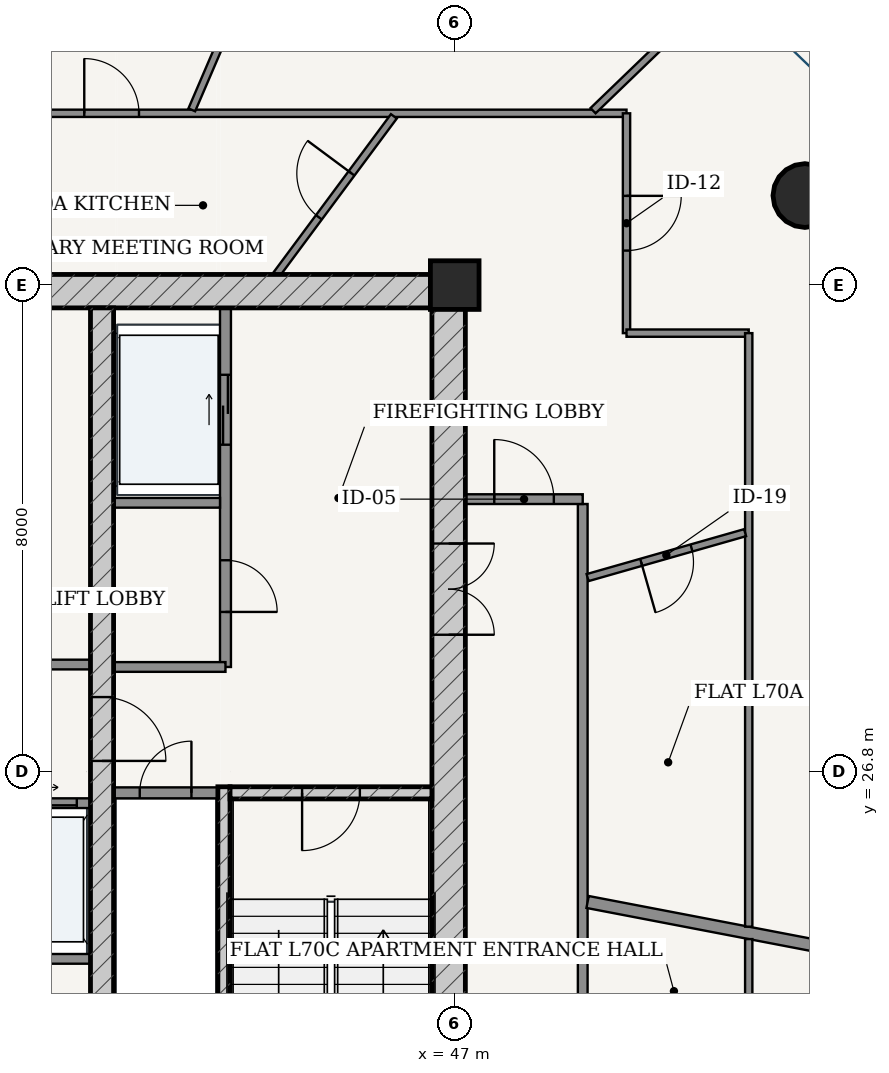
"""IFC4 building model, lengths in metres.
Left out: names, types, materials, properties, quantities, classifications, styles, units other than length and angle.
Written with IfcOpenShell. Run it as: python <this file> out.ifc"""

import sys

from ifc_helpers import new_model, si_unit, direction, frame, frame_2d, origin, origin_2d, place, context, subcontext, project, spatial, rectangle, hollow_circle, extrude, source, transform, mapped, element, fill, save


model = new_model("IFC4")
c1 = context("Model", 3, precision=1e-05, world=origin(), true_north=direction((-0.2419218956, 0.970295726276)))
c2 = subcontext(c1, "Body", "Model", "MODEL_VIEW")
j1 = project(units=[si_unit("LENGTHUNIT", "METRE"), si_unit("PLANEANGLEUNIT", "RADIAN")], contexts=[c1])
p1 = place(None, origin())
s1 = spatial("IfcSite", under=j1, at=p1, CompositionType="ELEMENT")
p2 = place(p1, origin())
s2 = spatial("IfcBuilding", under=s1, at=p2, CompositionType="ELEMENT")
p3 = place(p2, frame((0.0, 0.0, 266.95)))
s3 = spatial("IfcBuildingStorey", under=s2, at=p3, CompositionType="ELEMENT", Elevation=266.95)
p4 = place(p3, frame((47.0, 34.8, 0.0), z_axis=(0.0, 0.0, 1.0), x_axis=(1.0, 0.0, 0.0)))
e1 = element("IfcColumn", 1, at=p4, inside=s3, PredefinedType="COLUMN", context=c2, shape_type="SweptSolid", body=[
    extrude(rectangle(XDim=0.8, YDim=0.8, at=origin_2d()), origin(), (0.0, 0.0, 1.0), 3.75),
])
p5 = place(p3, frame((28.825, 34.7, 0.0), z_axis=(0.0, 0.0, 1.0), x_axis=(1.0, 0.0, 0.0)))
e2 = element("IfcWall", 2, at=p5, inside=s3, PredefinedType="SHEAR", context=c2, shape_type="SweptSolid", body=[
    extrude(rectangle(XDim=18.35, YDim=0.55, at=frame_2d((9.175, 0.0))), origin(), (0.0, 0.0, 1.0), 3.49),
])
p6 = place(p3, frame((46.9, 19.175, 0.0), z_axis=(0.0, 0.0, 1.0), x_axis=(0.0, 1.0, 0.0)))
e3 = element("IfcWall", 3, at=p6, inside=s3, PredefinedType="SHEAR", context=c2, shape_type="SweptSolid", body=[
    extrude(rectangle(XDim=15.25, YDim=0.55, at=frame_2d((7.625, 0.0))), origin(), (0.0, 0.0, 1.0), 3.49),
])
p7 = place(p6, frame((9.875, 0.0, 0.0)))
e4 = element("IfcOpeningElement", 4, at=p7, cuts=e3, PredefinedType="OPENING", context=c2, shape_type="SweptSolid", body=[
    extrude(rectangle(XDim=1.5, YDim=2.2, at=frame_2d((0.75, 1.1))), frame((0.0, 0.285, 0.0), z_axis=(0.0, -1.0, 0.0), x_axis=(1.0, 0.0, 0.0)), (0.0, 0.0, 1.0), 0.57),
])
p8 = place(p3, frame((43.205, 19.175, 0.0), z_axis=(0.0, 0.0, 1.0), x_axis=(0.0, 1.0, 0.0)))
e5 = element("IfcWall", 5, at=p8, inside=s3, PredefinedType="SOLIDWALL", context=c2, shape_type="SweptSolid", body=[
    extrude(rectangle(XDim=7.375, YDim=0.2, at=frame_2d((3.688, 0.0))), origin(), (0.0, 0.0, 1.0), 3.49),
])
p9 = place(p3, frame((43.305, 26.45, 0.0), z_axis=(0.0, 0.0, 1.0), x_axis=(1.0, 0.0, 0.0)))
e6 = element("IfcWall", 6, at=p9, inside=s3, PredefinedType="SOLIDWALL", context=c2, shape_type="SweptSolid", body=[
    extrude(rectangle(XDim=3.32, YDim=0.2, at=frame_2d((1.66, 0.0))), origin(), (0.0, 0.0, 1.0), 3.49),
])
p10 = place(p9, frame((1.185, 0.0, 0.0)))
e7 = element("IfcOpeningElement", 7, at=p10, cuts=e6, PredefinedType="OPENING", context=c2, shape_type="SweptSolid", body=[
    extrude(rectangle(XDim=0.95, YDim=2.15, at=frame_2d((0.475, 1.075))), frame((0.0, 0.11, 0.0), z_axis=(0.0, -1.0, 0.0), x_axis=(1.0, 0.0, 0.0)), (0.0, 0.0, 1.0), 0.22),
])
p11 = place(p3, frame((41.2, 19.175, 0.0), z_axis=(0.0, 0.0, 1.0), x_axis=(0.0, 1.0, 0.0)))
e8 = element("IfcWall", 8, at=p11, inside=s3, PredefinedType="SHEAR", context=c2, shape_type="SweptSolid", body=[
    extrude(rectangle(XDim=15.25, YDim=0.38, at=frame_2d((7.625, 0.0))), origin(), (0.0, 0.0, 1.0), 3.49),
])
p12 = place(p11, frame((7.8, 0.0, 0.0)))
e9 = element("IfcOpeningElement", 9, at=p12, cuts=e8, PredefinedType="OPENING", context=c2, shape_type="SweptSolid", body=[
    extrude(rectangle(XDim=1.05, YDim=2.15, at=frame_2d((0.525, 1.075))), frame((0.0, 0.2, 0.0), z_axis=(0.0, -1.0, 0.0), x_axis=(1.0, 0.0, 0.0)), (0.0, 0.0, 1.0), 0.4),
])
p13 = place(p3, frame((52.759, 36.272, 0.0), z_axis=(0.0, 0.0, 1.0), x_axis=(1.0, 0.0, 0.0)))
e10 = element("IfcColumn", 10, at=p13, inside=s3, PredefinedType="COLUMN", context=c2, shape_type="SweptSolid", body=[
    extrude(hollow_circle(Radius=0.525, WallThickness=0.035, at=origin_2d()), origin(), (0.0, 0.0, 1.0), 3.75),
])
p14 = place(p3, frame((41.39, 26.45, 0.0), z_axis=(0.0, 0.0, 1.0), x_axis=(1.0, 0.0, 0.0)))
e11 = element("IfcWall", 11, at=p14, inside=s3, PredefinedType="PARTITIONING", context=c2, shape_type="SweptSolid", body=[
    extrude(rectangle(XDim=1.71, YDim=0.18, at=frame_2d((0.855, 0.0))), origin(), (0.0, 0.0, 1.0), 3.49),
])
p15 = place(p14, frame((0.43, 0.0, 0.0)))
e12 = element("IfcOpeningElement", 12, at=p15, cuts=e11, PredefinedType="OPENING", context=c2, shape_type="SweptSolid", body=[
    extrude(rectangle(XDim=0.85, YDim=2.1, at=frame_2d((0.425, 1.05))), frame((0.0, 0.1, 0.0), z_axis=(0.0, -1.0, 0.0), x_axis=(1.0, 0.0, 0.0)), (0.0, 0.0, 1.0), 0.2),
])
p16 = place(p3, frame((43.23, 28.52, 0.0), z_axis=(0.0, 0.0, 1.0), x_axis=(0.0, 1.0, 0.0)))
e13 = element("IfcWall", 13, at=p16, inside=s3, PredefinedType="PARTITIONING", context=c2, shape_type="SweptSolid", body=[
    extrude(rectangle(XDim=5.905, YDim=0.18, at=frame_2d((2.953, 0.0))), origin(), (0.0, 0.0, 1.0), 3.49),
])
p17 = place(p16, frame((0.905, 0.0, 0.0)))
e14 = element("IfcOpeningElement", 14, at=p17, cuts=e13, PredefinedType="OPENING", context=c2, shape_type="SweptSolid", body=[
    extrude(rectangle(XDim=0.85, YDim=2.1, at=frame_2d((0.425, 1.05))), frame((0.0, 0.1, 0.0), z_axis=(0.0, -1.0, 0.0), x_axis=(1.0, 0.0, 0.0)), (0.0, 0.0, 1.0), 0.2),
])
p18 = place(p16, frame((3.655, 0.0, 0.0)))
e15 = element("IfcOpeningElement", 15, at=p18, cuts=e13, PredefinedType="OPENING", context=c2, shape_type="SweptSolid", body=[
    extrude(rectangle(XDim=1.15, YDim=2.2, at=frame_2d((0.575, 1.1))), frame((0.0, 0.1, 0.0), z_axis=(0.0, -1.0, 0.0), x_axis=(1.0, 0.0, 0.0)), (0.0, 0.0, 1.0), 0.2),
])
p19 = place(p3, frame((41.39, 31.22, 0.0), z_axis=(0.0, 0.0, 1.0), x_axis=(1.0, 0.0, 0.0)))
e16 = element("IfcWall", 16, at=p19, inside=s3, PredefinedType="PARTITIONING", context=c2, shape_type="SweptSolid", body=[
    extrude(rectangle(XDim=1.75, YDim=0.16, at=frame_2d((0.875, 0.0))), origin(), (0.0, 0.0, 1.0), 3.49),
])
p20 = place(p3, frame((41.39, 28.52, 0.0), z_axis=(0.0, 0.0, 1.0), x_axis=(1.0, 0.0, 0.0)))
e17 = element("IfcWall", 17, at=p20, inside=s3, PredefinedType="PARTITIONING", context=c2, shape_type="SweptSolid", body=[
    extrude(rectangle(XDim=1.84, YDim=0.16, at=frame_2d((0.92, 0.0))), origin(), (0.0, 0.0, 1.0), 3.49),
])
p21 = place(p3, frame((34.99, 28.56, 0.0), z_axis=(0.0, 0.0, 1.0), x_axis=(1.0, 0.0, 0.0)))
e18 = element("IfcWall", 18, at=p21, inside=s3, PredefinedType="PARTITIONING", context=c2, shape_type="SweptSolid", body=[
    extrude(rectangle(XDim=6.02, YDim=0.16, at=frame_2d((3.01, 0.0))), origin(), (0.0, 0.0, 1.0), 3.49),
])
p22 = place(p21, frame((2.585, 0.0, 0.0)))
e19 = element("IfcOpeningElement", 19, at=p22, cuts=e18, PredefinedType="OPENING", context=c2, shape_type="SweptSolid", body=[
    extrude(rectangle(XDim=0.85, YDim=2.1, at=frame_2d((0.425, 1.05))), frame((0.0, 0.09, 0.0), z_axis=(0.0, -1.0, 0.0), x_axis=(1.0, 0.0, 0.0)), (0.0, 0.0, 1.0), 0.18),
])
p23 = place(p3, frame((34.99, 26.28, 0.0), z_axis=(0.0, 0.0, 1.0), x_axis=(1.0, 0.0, 0.0)))
e20 = element("IfcWall", 20, at=p23, inside=s3, PredefinedType="PARTITIONING", context=c2, shape_type="SweptSolid", body=[
    extrude(rectangle(XDim=6.02, YDim=0.16, at=frame_2d((3.01, 0.0))), origin(), (0.0, 0.0, 1.0), 3.49),
])
p24 = place(p23, frame((1.045, 0.0, 0.0)))
e21 = element("IfcOpeningElement", 21, at=p24, cuts=e20, PredefinedType="OPENING", context=c2, shape_type="SweptSolid", body=[
    extrude(rectangle(XDim=0.85, YDim=2.1, at=frame_2d((0.425, 1.05))), frame((0.0, 0.09, 0.0), z_axis=(0.0, -1.0, 0.0), x_axis=(1.0, 0.0, 0.0)), (0.0, 0.0, 1.0), 0.18),
])
p25 = place(p23, frame((3.215, 0.0, 0.0)))
e22 = element("IfcOpeningElement", 22, at=p25, cuts=e20, PredefinedType="OPENING", context=c2, shape_type="SweptSolid", body=[
    extrude(rectangle(XDim=1.1, YDim=2.2, at=frame_2d((0.55, 1.1))), frame((0.0, 0.09, 0.0), z_axis=(0.0, -1.0, 0.0), x_axis=(1.0, 0.0, 0.0)), (0.0, 0.0, 1.0), 0.18),
])
p26 = place(p23, frame((4.695, 0.0, 0.0)))
e23 = element("IfcOpeningElement", 23, at=p26, cuts=e20, PredefinedType="OPENING", context=c2, shape_type="SweptSolid", body=[
    extrude(rectangle(XDim=1.1, YDim=2.2, at=frame_2d((0.55, 1.1))), frame((0.0, 0.09, 0.0), z_axis=(0.0, -1.0, 0.0), x_axis=(1.0, 0.0, 0.0)), (0.0, 0.0, 1.0), 0.18),
])
p27 = place(p3, frame((34.99, 23.72, 0.0), z_axis=(0.0, 0.0, 1.0), x_axis=(1.0, 0.0, 0.0)))
e24 = element("IfcWall", 24, at=p27, inside=s3, PredefinedType="PARTITIONING", context=c2, shape_type="SweptSolid", body=[
    extrude(rectangle(XDim=6.02, YDim=0.16, at=frame_2d((3.01, 0.0))), origin(), (0.0, 0.0, 1.0), 3.49),
])
p28 = place(p3, frame((49.105, 17.275, 0.0), z_axis=(0.0, 0.0, 1.0), x_axis=(0.0, 1.0, 0.0)))
e25 = element("IfcWall", 25, at=p28, inside=s3, PredefinedType="PARTITIONING", context=c2, shape_type="SweptSolid", body=[
    extrude(rectangle(XDim=13.925, YDim=0.16, at=frame_2d((6.962, 0.0))), origin(), (0.0, 0.0, 1.0), 3.015),
])
p29 = place(p28, frame((3.647, 0.0, 0.0)))
e26 = element("IfcOpeningElement", 26, at=p29, cuts=e25, PredefinedType="OPENING", context=c2, shape_type="SweptSolid", body=[
    extrude(rectangle(XDim=0.98, YDim=2.2, at=frame_2d((0.49, 1.1))), frame((0.0, 0.09, 0.0), z_axis=(0.0, -1.0, 0.0), x_axis=(1.0, 0.0, 0.0)), (0.0, 0.0, 1.0), 0.18),
])
p30 = place(p3, frame((47.175, 31.28, 0.0), z_axis=(0.0, 0.0, 1.0), x_axis=(1.0, 0.0, 0.0)))
e27 = element("IfcWall", 27, at=p30, inside=s3, PredefinedType="PARTITIONING", context=c2, shape_type="SweptSolid", body=[
    extrude(rectangle(XDim=1.93, YDim=0.16, at=frame_2d((0.965, 0.0))), origin(), (0.0, 0.0, 1.0), 3.49),
])
p31 = place(p30, frame((0.475, 0.0, 0.0)))
e28 = element("IfcOpeningElement", 28, at=p31, cuts=e27, PredefinedType="OPENING", context=c2, shape_type="SweptSolid", body=[
    extrude(rectangle(XDim=0.98, YDim=2.2, at=frame_2d((0.49, 1.1))), frame((0.0, 0.09, 0.0), z_axis=(0.0, -1.0, 0.0), x_axis=(1.0, 0.0, 0.0)), (0.0, 0.0, 1.0), 0.18),
])
p32 = place(p3, frame((49.185, 24.656, 0.0), z_axis=(0.0, 0.0, 1.0), x_axis=(0.982109889803, -0.188308694305, 0.0)))
e29 = element("IfcWall", 29, at=p32, inside=s3, PredefinedType="PARTITIONING", context=c2, shape_type="SweptSolid", body=[
    extrude(rectangle(XDim=7.884, YDim=0.2, at=frame_2d((3.942, 0.0))), origin(), (0.0, 0.0, 1.0), 3.015),
])
p33 = place(p3, frame((26.175, 37.625, 0.0), z_axis=(0.0, 0.0, 1.0), x_axis=(1.0, 0.0, 0.0)))
e30 = element("IfcWall", 30, at=p33, inside=s3, PredefinedType="PARTITIONING", context=c2, shape_type="SweptSolid", body=[
    extrude(rectangle(XDim=23.65, YDim=0.12, at=frame_2d((11.825, 0.0))), origin(), (0.0, 0.0, 1.0), 3.015),
])
p34 = place(p33, frame((14.733, 0.0, 0.0)))
e31 = element("IfcOpeningElement", 31, at=p34, cuts=e30, PredefinedType="OPENING", context=c2, shape_type="SweptSolid", body=[
    extrude(rectangle(XDim=0.9, YDim=2.15, at=frame_2d((0.45, 1.075))), frame((0.0, 0.07, 0.0), z_axis=(0.0, -1.0, 0.0), x_axis=(1.0, 0.0, 0.0)), (0.0, 0.0, 1.0), 0.14),
])
p35 = place(p33, frame((11.279, 0.0, 0.0)))
e32 = element("IfcOpeningElement", 32, at=p35, cuts=e30, PredefinedType="OPENING", context=c2, shape_type="SweptSolid", body=[
    extrude(rectangle(XDim=0.9, YDim=2.15, at=frame_2d((0.45, 1.075))), frame((0.0, 0.07, 0.0), z_axis=(0.0, -1.0, 0.0), x_axis=(1.0, 0.0, 0.0)), (0.0, 0.0, 1.0), 0.14),
])
p36 = place(p33, frame((2.678, 0.0, 0.0)))
e33 = element("IfcOpeningElement", 33, at=p36, cuts=e30, PredefinedType="OPENING", context=c2, shape_type="SweptSolid", body=[
    extrude(rectangle(XDim=0.9, YDim=2.15, at=frame_2d((0.45, 1.075))), frame((0.0, 0.07, 0.0), z_axis=(0.0, -1.0, 0.0), x_axis=(1.0, 0.0, 0.0)), (0.0, 0.0, 1.0), 0.14),
])
p37 = place(p3, frame((49.825, 37.625, 0.0), z_axis=(0.0, 0.0, 1.0), x_axis=(0.0, -1.0, 0.0)))
e34 = element("IfcWall", 34, at=p37, inside=s3, PredefinedType="PARTITIONING", context=c2, shape_type="SweptSolid", body=[
    extrude(rectangle(XDim=3.615, YDim=0.12, at=frame_2d((1.808, 0.0))), origin(), (0.0, 0.0, 1.0), 3.015),
])
p38 = place(p37, frame((1.357, 0.0, 0.0)))
e35 = element("IfcOpeningElement", 35, at=p38, cuts=e34, PredefinedType="OPENING", context=c2, shape_type="SweptSolid", body=[
    extrude(rectangle(XDim=0.9, YDim=2.15, at=frame_2d((0.45, 1.075))), frame((0.0, 0.07, 0.0), z_axis=(0.0, -1.0, 0.0), x_axis=(1.0, 0.0, 0.0)), (0.0, 0.0, 1.0), 0.14),
])
p39 = place(p3, frame((49.825, 34.01, 0.0), z_axis=(0.0, 0.0, 1.0), x_axis=(1.0, 0.0, 0.0)))
e36 = element("IfcWall", 36, at=p39, inside=s3, PredefinedType="PARTITIONING", context=c2, shape_type="SweptSolid", body=[
    extrude(rectangle(XDim=2.01, YDim=0.12, at=frame_2d((1.005, 0.0))), origin(), (0.0, 0.0, 1.0), 3.209),
])
p40 = place(p3, frame((51.835, 34.01, 0.0), z_axis=(0.0, 0.0, 1.0), x_axis=(0.0, -1.0, 0.0)))
e37 = element("IfcWall", 37, at=p40, inside=s3, PredefinedType="PARTITIONING", context=c2, shape_type="SweptSolid", body=[
    extrude(rectangle(XDim=9.761, YDim=0.12, at=frame_2d((4.88, 0.0))), origin(), (0.0, 0.0, 1.0), 3.015),
])
p41 = place(p3, frame((49.275, 37.668, 0.0), z_axis=(0.0, 0.0, 1.0), x_axis=(0.719954096891, 0.694021684366, 0.0)))
e38 = element("IfcWall", 38, at=p41, inside=s3, PredefinedType="PARTITIONING", context=c2, shape_type="SweptSolid", body=[
    extrude(rectangle(XDim=3.333, YDim=0.12, at=frame_2d((1.667, 0.0))), origin(), (0.0, 0.0, 1.0), 3.121),
])
p42 = place(p3, frame((42.676, 37.682, 0.0), z_axis=(0.0, 0.0, 1.0), x_axis=(0.394777489933, 0.918776759307, 0.0)))
e39 = element("IfcWall", 39, at=p42, inside=s3, PredefinedType="PARTITIONING", context=c2, shape_type="SweptSolid", body=[
    extrude(rectangle(XDim=6.9, YDim=0.12, at=frame_2d((3.45, 0.0))), origin(), (0.0, 0.0, 1.0), 3.121),
])
p43 = place(p42, frame((3.0, 0.0, 0.0)))
e40 = element("IfcOpeningElement", 40, at=p43, cuts=e39, PredefinedType="OPENING", context=c2, shape_type="SweptSolid", body=[
    extrude(rectangle(XDim=0.9, YDim=2.15, at=frame_2d((0.45, 1.075))), frame((0.0, 0.07, 0.0), z_axis=(0.0, -1.0, 0.0), x_axis=(1.0, 0.0, 0.0)), (0.0, 0.0, 1.0), 0.14),
])
p44 = place(p3, frame((49.185, 29.99, 0.0), z_axis=(0.0, 0.0, 1.0), x_axis=(0.961653809431, 0.274266204273, 0.0)))
e41 = element("IfcWall", 41, at=p44, inside=s3, PredefinedType="PARTITIONING", context=c2, shape_type="SweptSolid", body=[
    extrude(rectangle(XDim=2.694, YDim=0.12, at=frame_2d((1.347, 0.0))), origin(), (0.0, 0.0, 1.0), 3.209),
])
p45 = place(p44, frame((0.917, 0.0, 0.0)))
e42 = element("IfcOpeningElement", 42, at=p45, cuts=e41, PredefinedType="OPENING", context=c2, shape_type="SweptSolid", body=[
    extrude(rectangle(XDim=0.86, YDim=2.15, at=frame_2d((0.43, 1.075))), frame((0.0, 0.07, 0.0), z_axis=(0.0, -1.0, 0.0), x_axis=(1.0, 0.0, 0.0)), (0.0, 0.0, 1.0), 0.14),
])
p46 = place(p3, frame((44.07, 34.977, 0.0), z_axis=(0.0, 0.0, 1.0), x_axis=(0.596033679783, 0.802959433947, 0.0)))
e43 = element("IfcWall", 43, at=p46, inside=s3, PredefinedType="PARTITIONING", context=c2, shape_type="SweptSolid", body=[
    extrude(rectangle(XDim=3.236, YDim=0.12, at=frame_2d((1.618, 0.0))), origin(), (0.0, 0.0, 1.0), 3.49),
])
p47 = place(p46, frame((1.168, 0.0, 0.0)))
e44 = element("IfcOpeningElement", 44, at=p47, cuts=e43, PredefinedType="OPENING", context=c2, shape_type="SweptSolid", body=[
    extrude(rectangle(XDim=0.9, YDim=2.15, at=frame_2d((0.45, 1.075))), frame((0.0, 0.07, 0.0), z_axis=(0.0, -1.0, 0.0), x_axis=(1.0, 0.0, 0.0)), (0.0, 0.0, 1.0), 0.14),
])
p48 = place(p3, frame((51.835, 24.045, 0.0), z_axis=(0.0, 0.0, 1.0), x_axis=(0.0, -1.0, 0.0)))
e45 = element("IfcWall", 45, at=p48, inside=s3, PredefinedType="PARTITIONING", context=c2, shape_type="SweptSolid", body=[
    extrude(rectangle(XDim=9.58, YDim=0.12, at=frame_2d((4.79, 0.0))), origin(), (0.0, 0.0, 1.0), 3.015),
])
p49 = place(p48, frame((2.771, 0.0, 0.0)))
e46 = element("IfcOpeningElement", 46, at=p49, cuts=e45, PredefinedType="OPENING", context=c2, shape_type="SweptSolid", body=[
    extrude(rectangle(XDim=0.9, YDim=2.15, at=frame_2d((0.45, 1.075))), frame((0.0, 0.07, 0.0), z_axis=(0.0, -1.0, 0.0), x_axis=(1.0, 0.0, 0.0)), (0.0, 0.0, 1.0), 0.14),
])
p50 = place(p48, frame((8.073, 0.0, 0.0)))
e47 = element("IfcOpeningElement", 47, at=p50, cuts=e45, PredefinedType="OPENING", context=c2, shape_type="SweptSolid", body=[
    extrude(rectangle(XDim=0.9, YDim=2.15, at=frame_2d((0.45, 1.075))), frame((0.0, 0.07, 0.0), z_axis=(0.0, -1.0, 0.0), x_axis=(1.0, 0.0, 0.0)), (0.0, 0.0, 1.0), 0.14),
])
m1 = source(origin(), c2, "Body", "SweptSolid", [
    extrude(rectangle(XDim=1.5, YDim=2.2, at=frame_2d((0.75, 1.1))), frame((0.0, 0.025, 0.0), z_axis=(0.0, -1.0, 0.0), x_axis=(1.0, 0.0, 0.0)), (0.0, 0.0, 1.0), 0.05),
])
p51 = place(p7, frame((1.5, 0.0, 0.0), z_axis=(0.0, 0.0, 1.0), x_axis=(-1.0, 0.0, 0.0)))
e48 = element("IfcDoor", 48, at=p51, inside=s3, OperationType="DOUBLE_DOOR_SINGLE_SWING", PredefinedType="DOOR", context=c2, shape_type="MappedRepresentation", body=[
    mapped(m1, transform((0.0, 0.0, 0.0), scale=1.0)),
])
fill(e4, e48)
m2 = source(origin(), c2, "Body", "SweptSolid", [
    extrude(rectangle(XDim=1.05, YDim=2.15, at=frame_2d((0.525, 1.075))), frame((0.0, 0.025, 0.0), z_axis=(0.0, -1.0, 0.0), x_axis=(1.0, 0.0, 0.0)), (0.0, 0.0, 1.0), 0.05),
])
p52 = place(p12, frame((1.05, 0.0, 0.0), z_axis=(0.0, 0.0, 1.0), x_axis=(-1.0, 0.0, 0.0)))
e49 = element("IfcDoor", 49, at=p52, inside=s3, OperationType="SINGLE_SWING_RIGHT", PredefinedType="DOOR", context=c2, shape_type="MappedRepresentation", body=[
    mapped(m2, transform((0.0, 0.0, 0.0), scale=1.0)),
])
fill(e9, e49)
m3 = source(origin(), c2, "Body", "SweptSolid", [
    extrude(rectangle(XDim=0.95, YDim=2.15, at=frame_2d((0.475, 1.075))), frame((0.0, 0.025, 0.0), z_axis=(0.0, -1.0, 0.0), x_axis=(1.0, 0.0, 0.0)), (0.0, 0.0, 1.0), 0.05),
])
p53 = place(p10, frame((0.95, 0.0, 0.0), z_axis=(0.0, 0.0, 1.0), x_axis=(-1.0, 0.0, 0.0)))
e50 = element("IfcDoor", 50, at=p53, inside=s3, OperationType="SINGLE_SWING_RIGHT", PredefinedType="DOOR", context=c2, shape_type="MappedRepresentation", body=[
    mapped(m3, transform((0.0, 0.0, 0.0), scale=1.0)),
])
fill(e7, e50)
m4 = source(origin(), c2, "Body", "SweptSolid", [
    extrude(rectangle(XDim=0.85, YDim=2.1, at=frame_2d((0.425, 1.05))), frame((0.0, 0.025, 0.0), z_axis=(0.0, -1.0, 0.0), x_axis=(1.0, 0.0, 0.0)), (0.0, 0.0, 1.0), 0.05),
])
p54 = place(p15, origin())
e51 = element("IfcDoor", 51, at=p54, inside=s3, OperationType="SINGLE_SWING_RIGHT", PredefinedType="DOOR", context=c2, shape_type="MappedRepresentation", body=[
    mapped(m4, transform((0.0, 0.0, 0.0), scale=1.0)),
])
fill(e12, e51)
p55 = place(p17, frame((0.85, 0.0, 0.0), z_axis=(0.0, 0.0, 1.0), x_axis=(-1.0, 0.0, 0.0)))
e52 = element("IfcDoor", 52, at=p55, inside=s3, OperationType="SINGLE_SWING_RIGHT", PredefinedType="DOOR", context=c2, shape_type="MappedRepresentation", body=[
    mapped(m4, transform((0.0, 0.0, 0.0), scale=1.0)),
])
fill(e14, e52)
m5 = source(origin(), c2, "Body", "SweptSolid", [
    extrude(rectangle(XDim=1.15, YDim=2.2, at=frame_2d((0.575, 1.1))), frame((0.0, 0.025, 0.0), z_axis=(0.0, -1.0, 0.0), x_axis=(1.0, 0.0, 0.0)), (0.0, 0.0, 1.0), 0.05),
])
p56 = place(p18, origin())
e53 = element("IfcDoor", 53, at=p56, inside=s3, OperationType="DOUBLE_DOOR_SLIDING", PredefinedType="DOOR", context=c2, shape_type="MappedRepresentation", body=[
    mapped(m5, transform((0.0, 0.0, 0.0), scale=1.0)),
])
fill(e15, e53)
m6 = source(origin(), c2, "Body", "SweptSolid", [
    extrude(rectangle(XDim=1.1, YDim=2.2, at=frame_2d((0.55, 1.1))), frame((0.0, 0.025, 0.0), z_axis=(0.0, -1.0, 0.0), x_axis=(1.0, 0.0, 0.0)), (0.0, 0.0, 1.0), 0.05),
])
p57 = place(p26, origin())
e54 = element("IfcDoor", 54, at=p57, inside=s3, OperationType="DOUBLE_DOOR_SLIDING", PredefinedType="DOOR", context=c2, shape_type="MappedRepresentation", body=[
    mapped(m6, transform((0.0, 0.0, 0.0), scale=1.0)),
])
fill(e23, e54)
m7 = source(origin(), c2, "Body", "SweptSolid", [
    extrude(rectangle(XDim=0.98, YDim=2.2, at=frame_2d((0.49, 1.1))), frame((0.0, 0.025, 0.0), z_axis=(0.0, -1.0, 0.0), x_axis=(1.0, 0.0, 0.0)), (0.0, 0.0, 1.0), 0.05),
])
p58 = place(p31, origin())
e55 = element("IfcDoor", 55, at=p58, inside=s3, OperationType="SINGLE_SWING_LEFT", PredefinedType="DOOR", context=c2, shape_type="MappedRepresentation", body=[
    mapped(m7, transform((0.0, 0.0, 0.0), scale=1.0)),
])
fill(e28, e55)
m8 = source(origin(), c2, "Body", "SweptSolid", [
    extrude(rectangle(XDim=0.86, YDim=2.15, at=frame_2d((0.43, 1.075))), frame((0.0, 0.025, 0.0), z_axis=(0.0, -1.0, 0.0), x_axis=(1.0, 0.0, 0.0)), (0.0, 0.0, 1.0), 0.05),
])
p59 = place(p45, frame((0.86, 0.0, 0.0), z_axis=(0.0, 0.0, 1.0), x_axis=(-1.0, 0.0, 0.0)))
e56 = element("IfcDoor", 56, at=p59, inside=s3, OperationType="SINGLE_SWING_RIGHT", PredefinedType="DOOR", context=c2, shape_type="MappedRepresentation", body=[
    mapped(m8, transform((0.0, 0.0, 0.0), scale=1.0)),
])
fill(e42, e56)
m9 = source(origin(), c2, "Body", "SweptSolid", [
    extrude(rectangle(XDim=0.9, YDim=2.15, at=frame_2d((0.45, 1.075))), frame((0.0, 0.025, 0.0), z_axis=(0.0, -1.0, 0.0), x_axis=(1.0, 0.0, 0.0)), (0.0, 0.0, 1.0), 0.05),
])
p60 = place(p38, origin())
e57 = element("IfcDoor", 57, at=p60, inside=s3, OperationType="SINGLE_SWING_LEFT", PredefinedType="DOOR", context=c2, shape_type="MappedRepresentation", body=[
    mapped(m9, transform((0.0, 0.0, 0.0), scale=1.0)),
])
fill(e35, e57)
p61 = place(p47, origin())
e58 = element("IfcDoor", 58, at=p61, inside=s3, OperationType="SINGLE_SWING_RIGHT", PredefinedType="DOOR", context=c2, shape_type="MappedRepresentation", body=[
    mapped(m9, transform((0.0, 0.0, 0.0), scale=1.0)),
])
fill(e44, e58)
p62 = place(p34, origin())
e59 = element("IfcDoor", 59, at=p62, inside=s3, OperationType="SINGLE_SWING_LEFT", PredefinedType="DOOR", context=c2, shape_type="MappedRepresentation", body=[
    mapped(m9, transform((0.0, 0.0, 0.0), scale=1.0)),
])
fill(e31, e59)
save(model, sys.argv[1])
